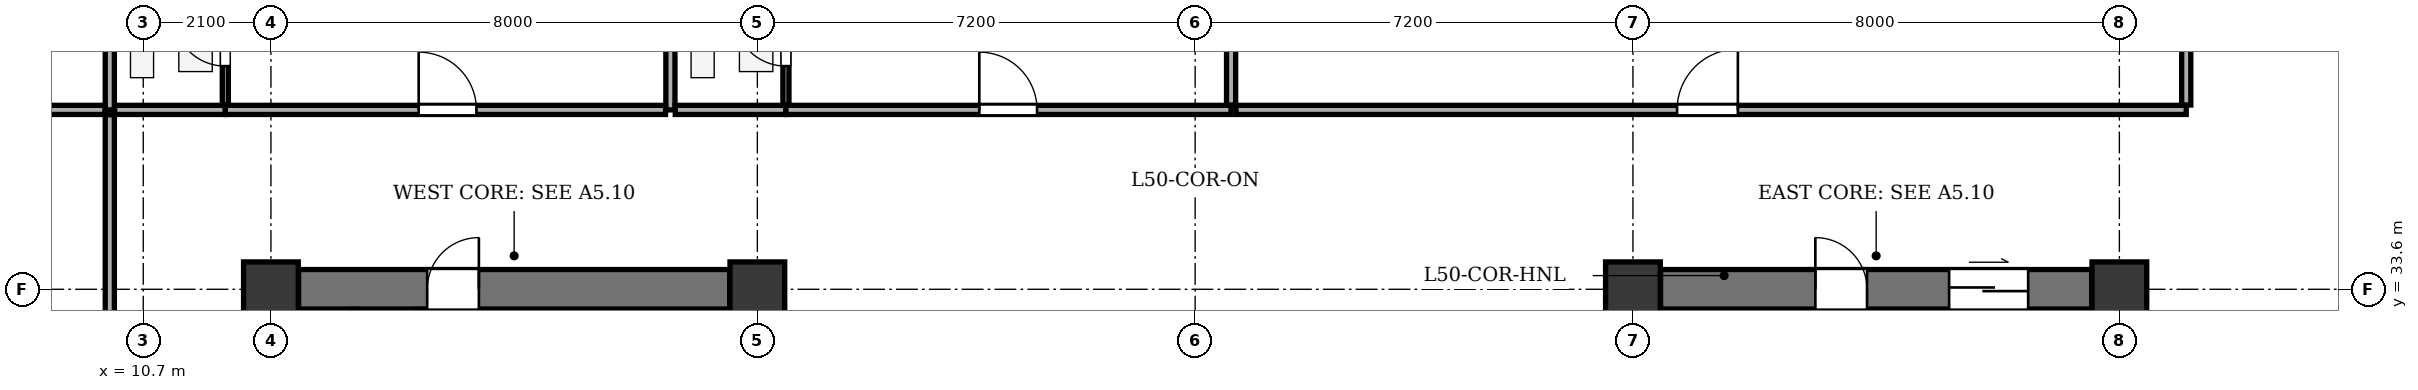
"""IFC4 building model, lengths in metres.
Left out: names, types, materials, properties, quantities, classifications, styles, units other than length and angle.
Written with IfcOpenShell. Run it as: python <this file> out.ifc"""

import sys

from ifc_helpers import new_model, si_unit, direction, frame, frame_2d, origin, origin_2d, place, context, subcontext, project, spatial, rectangle, extrude, element, fill, save


model = new_model("IFC4")
c1 = context("Model", 3, precision=1e-05, world=origin(), true_north=direction((0.0, 1.0)))
c2 = subcontext(c1, "Body", "Model", "MODEL_VIEW")
j1 = project(units=[si_unit("LENGTHUNIT", "METRE"), si_unit("PLANEANGLEUNIT", "RADIAN")], contexts=[c1])
p1 = place(None, origin())
s1 = spatial("IfcSite", under=j1, at=p1, CompositionType="ELEMENT")
p2 = place(p1, origin())
s2 = spatial("IfcBuilding", under=s1, at=p2, CompositionType="ELEMENT")
p3 = place(p2, frame((0.0, 0.0, 193.8)))
s3 = spatial("IfcBuildingStorey", under=s2, at=p3, CompositionType="ELEMENT", Elevation=193.8)
for number, where, z_axis, x_axis in (
    (1, (12.8, 33.6, 0.0), (0.0, 0.0, 1.0), (1.0, 0.0, 0.0)),
    (2, (20.8, 33.6, 0.0), (0.0, 0.0, 1.0), (1.0, 0.0, 0.0)),
    (3, (35.2, 33.6, 0.0), (0.0, 0.0, 1.0), (1.0, 0.0, 0.0)),
    (4, (43.2, 33.6, 0.0), (0.0, 0.0, 1.0), (1.0, 0.0, 0.0)),
):
    element("IfcColumn", number, at=place(p3, frame(where, z_axis=z_axis, x_axis=x_axis)), inside=s3, PredefinedType="COLUMN", context=c2, shape_type="SweptSolid", body=[
        extrude(rectangle(XDim=0.9, YDim=0.9, at=origin_2d()), origin(), (0.0, 0.0, 1.0), 3.5),
    ])
p4 = place(p3, frame((13.255, 33.6, 0.0), z_axis=(0.0, 0.0, 1.0), x_axis=(1.0, 0.0, 0.0)))
e5 = element("IfcWall", 5, at=p4, inside=s3, PredefinedType="SHEAR", context=c2, shape_type="SweptSolid", body=[
    extrude(rectangle(XDim=7.09, YDim=0.65, at=frame_2d((3.545, 0.0))), origin(), (0.0, 0.0, 1.0), 3.05),
])
p5 = place(p4, frame((2.115, 0.0, 0.0)))
e6 = element("IfcOpeningElement", 6, at=p5, cuts=e5, PredefinedType="OPENING", context=c2, shape_type="SweptSolid", body=[
    extrude(rectangle(XDim=0.85, YDim=2.02, at=frame_2d((0.425, 1.01))), frame((0.0, 0.335, 0.0), z_axis=(0.0, -1.0, 0.0), x_axis=(1.0, 0.0, 0.0)), (0.0, 0.0, 1.0), 0.67),
])
p6 = place(p3, frame((16.435, 21.135, 0.0), z_axis=(0.0, 0.0, 1.0), x_axis=(0.0, 1.0, 0.0)))
e7 = element("IfcWall", 7, at=p6, inside=s3, PredefinedType="SHEAR", context=c2, shape_type="SweptSolid", body=[
    extrude(rectangle(XDim=12.13, YDim=0.25, at=frame_2d((6.065, 0.0))), origin(), (0.0, 0.0, 1.0), 3.05),
])
p7 = place(p6, frame((0.515, 0.0, 0.0)))
e8 = element("IfcOpeningElement", 8, at=p7, cuts=e7, PredefinedType="OPENING", context=c2, shape_type="SweptSolid", body=[
    extrude(rectangle(XDim=1.2, YDim=2.15, at=frame_2d((0.6, 1.075))), frame((0.0, 0.135, 0.0), z_axis=(0.0, -1.0, 0.0), x_axis=(1.0, 0.0, 0.0)), (0.0, 0.0, 1.0), 0.27),
])
p8 = place(p6, frame((2.665, 0.0, 0.0)))
e9 = element("IfcOpeningElement", 9, at=p8, cuts=e7, PredefinedType="OPENING", context=c2, shape_type="SweptSolid", body=[
    extrude(rectangle(XDim=1.15, YDim=2.15, at=frame_2d((0.575, 1.075))), frame((0.0, 0.135, 0.0), z_axis=(0.0, -1.0, 0.0), x_axis=(1.0, 0.0, 0.0)), (0.0, 0.0, 1.0), 0.27),
])
p9 = place(p3, frame((18.12, 31.17, 0.0), z_axis=(0.0, 0.0, 1.0), x_axis=(0.0, 1.0, 0.0)))
e10 = element("IfcWall", 10, at=p9, inside=s3, PredefinedType="PARTITIONING", context=c2, shape_type="SweptSolid", body=[
    extrude(rectangle(XDim=2.095, YDim=0.18, at=frame_2d((1.047, 0.0))), origin(), (0.0, 0.0, 1.0), 3.05),
])
p10 = place(p3, frame((35.655, 33.6, 0.0), z_axis=(0.0, 0.0, 1.0), x_axis=(1.0, 0.0, 0.0)))
e11 = element("IfcWall", 11, at=p10, inside=s3, PredefinedType="SHEAR", context=c2, shape_type="SweptSolid", body=[
    extrude(rectangle(XDim=7.09, YDim=0.65, at=frame_2d((3.545, 0.0))), origin(), (0.0, 0.0, 1.0), 3.05),
])
p11 = place(p10, frame((4.745, 0.0, 0.0)))
e12 = element("IfcOpeningElement", 12, at=p11, cuts=e11, PredefinedType="OPENING", context=c2, shape_type="SweptSolid", body=[
    extrude(rectangle(XDim=1.3, YDim=2.15, at=frame_2d((0.65, 1.075))), frame((0.0, 0.335, 0.0), z_axis=(0.0, -1.0, 0.0), x_axis=(1.0, 0.0, 0.0)), (0.0, 0.0, 1.0), 0.67),
])
p12 = place(p10, frame((2.545, 0.0, 0.0)))
e13 = element("IfcOpeningElement", 13, at=p12, cuts=e11, PredefinedType="OPENING", context=c2, shape_type="SweptSolid", body=[
    extrude(rectangle(XDim=0.85, YDim=2.02, at=frame_2d((0.425, 1.01))), frame((0.0, 0.335, 0.0), z_axis=(0.0, -1.0, 0.0), x_axis=(1.0, 0.0, 0.0)), (0.0, 0.0, 1.0), 0.67),
])
p13 = place(p3, frame((39.565, 21.135, 0.0), z_axis=(0.0, 0.0, 1.0), x_axis=(0.0, 1.0, 0.0)))
e14 = element("IfcWall", 14, at=p13, inside=s3, PredefinedType="SHEAR", context=c2, shape_type="SweptSolid", body=[
    extrude(rectangle(XDim=12.13, YDim=0.25, at=frame_2d((6.065, 0.0))), origin(), (0.0, 0.0, 1.0), 3.05),
])
p14 = place(p13, frame((0.515, 0.0, 0.0)))
e15 = element("IfcOpeningElement", 15, at=p14, cuts=e14, PredefinedType="OPENING", context=c2, shape_type="SweptSolid", body=[
    extrude(rectangle(XDim=1.2, YDim=2.15, at=frame_2d((0.6, 1.075))), frame((0.0, 0.135, 0.0), z_axis=(0.0, -1.0, 0.0), x_axis=(1.0, 0.0, 0.0)), (0.0, 0.0, 1.0), 0.27),
])
p15 = place(p13, frame((2.665, 0.0, 0.0)))
e16 = element("IfcOpeningElement", 16, at=p15, cuts=e14, PredefinedType="OPENING", context=c2, shape_type="SweptSolid", body=[
    extrude(rectangle(XDim=1.15, YDim=2.15, at=frame_2d((0.575, 1.075))), frame((0.0, 0.135, 0.0), z_axis=(0.0, -1.0, 0.0), x_axis=(1.0, 0.0, 0.0)), (0.0, 0.0, 1.0), 0.27),
])
p16 = place(p3, frame((37.9, 25.27, 0.0), z_axis=(0.0, 0.0, 1.0), x_axis=(0.0, 1.0, 0.0)))
e17 = element("IfcWall", 17, at=p16, inside=s3, PredefinedType="SOLIDWALL", context=c2, shape_type="SweptSolid", body=[
    extrude(rectangle(XDim=7.995, YDim=0.2, at=frame_2d((3.998, 0.0))), origin(), (0.0, 0.0, 1.0), 3.05),
])
p17 = place(p3, frame((14.18, 30.96, 0.0), z_axis=(0.0, 0.0, 1.0), x_axis=(0.0, 1.0, 0.0)))
e18 = element("IfcWall", 18, at=p17, inside=s3, PredefinedType="PARTITIONING", context=c2, shape_type="SweptSolid", body=[
    extrude(rectangle(XDim=2.31, YDim=0.15, at=frame_2d((1.155, 0.0))), origin(), (0.0, 0.0, 1.0), 3.05),
])
p18 = place(p17, frame((0.47, 0.0, 0.0)))
e19 = element("IfcOpeningElement", 19, at=p18, cuts=e18, PredefinedType="OPENING", context=c2, shape_type="SweptSolid", body=[
    extrude(rectangle(XDim=0.85, YDim=2.02, at=frame_2d((0.425, 1.01))), frame((0.0, 0.085, 0.0), z_axis=(0.0, -1.0, 0.0), x_axis=(1.0, 0.0, 0.0)), (0.0, 0.0, 1.0), 0.17),
])
p19 = place(p3, frame((15.25, 30.96, 0.0), z_axis=(0.0, 0.0, 1.0), x_axis=(0.0, 1.0, 0.0)))
e20 = element("IfcWall", 20, at=p19, inside=s3, PredefinedType="PARTITIONING", context=c2, shape_type="SweptSolid", body=[
    extrude(rectangle(XDim=2.31, YDim=0.15, at=frame_2d((1.155, 0.0))), origin(), (0.0, 0.0, 1.0), 3.05),
])
p20 = place(p19, frame((0.47, 0.0, 0.0)))
e21 = element("IfcOpeningElement", 21, at=p20, cuts=e20, PredefinedType="OPENING", context=c2, shape_type="SweptSolid", body=[
    extrude(rectangle(XDim=0.85, YDim=2.02, at=frame_2d((0.425, 1.01))), frame((0.0, 0.085, 0.0), z_axis=(0.0, -1.0, 0.0), x_axis=(1.0, 0.0, 0.0)), (0.0, 0.0, 1.0), 0.17),
])
for number, where, z_axis, x_axis in (
    (22, (10.15, 36.55, 0.0), (0.0, 0.0, 1.0), (0.0, 1.0, 0.0)),
    (23, (19.37, 36.55, 0.0), (0.0, 0.0, 1.0), (0.0, 1.0, 0.0)),
):
    element("IfcWall", number, at=place(p3, frame(where, z_axis=z_axis, x_axis=x_axis)), inside=s3, PredefinedType="PARTITIONING", context=c2, shape_type="SweptSolid", body=[
        extrude(rectangle(XDim=15.975, YDim=0.15, at=frame_2d((7.987, 0.0))), origin(), (0.0, 0.0, 1.0), 3.05),
    ])
p21 = place(p3, frame((10.23, 36.55, 0.0), z_axis=(0.0, 0.0, 1.0), x_axis=(1.0, 0.0, 0.0)))
e24 = element("IfcWall", 24, at=p21, inside=s3, PredefinedType="PARTITIONING", context=c2, shape_type="SweptSolid", body=[
    extrude(rectangle(XDim=1.82, YDim=0.15, at=frame_2d((0.91, 0.0))), origin(), (0.0, 0.0, 1.0), 3.05),
])
p22 = place(p3, frame((12.05, 36.55, 0.0), z_axis=(0.0, 0.0, 1.0), x_axis=(1.0, 0.0, 0.0)))
e25 = element("IfcWall", 25, at=p22, inside=s3, PredefinedType="PARTITIONING", context=c2, shape_type="SweptSolid", body=[
    extrude(rectangle(XDim=7.24, YDim=0.15, at=frame_2d((3.62, 0.0))), origin(), (0.0, 0.0, 1.0), 3.05),
])
p23 = place(p22, frame((3.18, 0.0, 0.0)))
e26 = element("IfcOpeningElement", 26, at=p23, cuts=e25, PredefinedType="OPENING", context=c2, shape_type="SweptSolid", body=[
    extrude(rectangle(XDim=0.95, YDim=2.1, at=frame_2d((0.475, 1.05))), frame((0.0, 0.085, 0.0), z_axis=(0.0, -1.0, 0.0), x_axis=(1.0, 0.0, 0.0)), (0.0, 0.0, 1.0), 0.17),
])
p24 = place(p3, frame((12.05, 36.63, 0.0), z_axis=(0.0, 0.0, 1.0), x_axis=(0.0, 1.0, 0.0)))
e27 = element("IfcWall", 27, at=p24, inside=s3, PredefinedType="PARTITIONING", context=c2, shape_type="SweptSolid", body=[
    extrude(rectangle(XDim=2.25, YDim=0.1, at=frame_2d((1.125, 0.0))), origin(), (0.0, 0.0, 1.0), 3.05),
])
p25 = place(p24, frame((0.64, 0.0, 0.0)))
e28 = element("IfcOpeningElement", 28, at=p25, cuts=e27, PredefinedType="OPENING", context=c2, shape_type="SweptSolid", body=[
    extrude(rectangle(XDim=0.85, YDim=2.05, at=frame_2d((0.425, 1.025))), frame((0.0, 0.06, 0.0), z_axis=(0.0, -1.0, 0.0), x_axis=(1.0, 0.0, 0.0)), (0.0, 0.0, 1.0), 0.12),
])
p26 = place(p3, frame((19.45, 36.55, 0.0), z_axis=(0.0, 0.0, 1.0), x_axis=(1.0, 0.0, 0.0)))
e29 = element("IfcWall", 29, at=p26, inside=s3, PredefinedType="PARTITIONING", context=c2, shape_type="SweptSolid", body=[
    extrude(rectangle(XDim=1.82, YDim=0.15, at=frame_2d((0.91, 0.0))), origin(), (0.0, 0.0, 1.0), 3.05),
])
p27 = place(p3, frame((21.27, 36.55, 0.0), z_axis=(0.0, 0.0, 1.0), x_axis=(1.0, 0.0, 0.0)))
e30 = element("IfcWall", 30, at=p27, inside=s3, PredefinedType="PARTITIONING", context=c2, shape_type="SweptSolid", body=[
    extrude(rectangle(XDim=7.321, YDim=0.15, at=frame_2d((3.661, 0.0))), origin(), (0.0, 0.0, 1.0), 3.05),
])
p28 = place(p27, frame((3.18, 0.0, 0.0)))
e31 = element("IfcOpeningElement", 31, at=p28, cuts=e30, PredefinedType="OPENING", context=c2, shape_type="SweptSolid", body=[
    extrude(rectangle(XDim=0.95, YDim=2.1, at=frame_2d((0.475, 1.05))), frame((0.0, 0.085, 0.0), z_axis=(0.0, -1.0, 0.0), x_axis=(1.0, 0.0, 0.0)), (0.0, 0.0, 1.0), 0.17),
])
p29 = place(p3, frame((21.27, 36.63, 0.0), z_axis=(0.0, 0.0, 1.0), x_axis=(0.0, 1.0, 0.0)))
e32 = element("IfcWall", 32, at=p29, inside=s3, PredefinedType="PARTITIONING", context=c2, shape_type="SweptSolid", body=[
    extrude(rectangle(XDim=2.25, YDim=0.1, at=frame_2d((1.125, 0.0))), origin(), (0.0, 0.0, 1.0), 3.05),
])
p30 = place(p29, frame((0.64, 0.0, 0.0)))
e33 = element("IfcOpeningElement", 33, at=p30, cuts=e32, PredefinedType="OPENING", context=c2, shape_type="SweptSolid", body=[
    extrude(rectangle(XDim=0.85, YDim=2.05, at=frame_2d((0.425, 1.025))), frame((0.0, 0.06, 0.0), z_axis=(0.0, -1.0, 0.0), x_axis=(1.0, 0.0, 0.0)), (0.0, 0.0, 1.0), 0.12),
])
p31 = place(p3, frame((28.591, 36.63, 0.0), z_axis=(0.0, 0.0, 1.0), x_axis=(0.0, 1.0, 0.0)))
e34 = element("IfcWall", 34, at=p31, inside=s3, PredefinedType="PARTITIONING", context=c2, shape_type="SweptSolid", body=[
    extrude(rectangle(XDim=15.895, YDim=0.15, at=frame_2d((7.948, 0.0))), origin(), (0.0, 0.0, 1.0), 3.05),
])
p32 = place(p3, frame((28.671, 36.55, 0.0), z_axis=(0.0, 0.0, 1.0), x_axis=(1.0, 0.0, 0.0)))
e35 = element("IfcWall", 35, at=p32, inside=s3, PredefinedType="PARTITIONING", context=c2, shape_type="SweptSolid", body=[
    extrude(rectangle(XDim=15.629, YDim=0.15, at=frame_2d((7.814, 0.0))), origin(), (0.0, 0.0, 1.0), 3.05),
])
p33 = place(p32, frame((7.255, 0.0, 0.0)))
e36 = element("IfcOpeningElement", 36, at=p33, cuts=e35, PredefinedType="OPENING", context=c2, shape_type="SweptSolid", body=[
    extrude(rectangle(XDim=1.0, YDim=2.1, at=frame_2d((0.5, 1.05))), frame((0.0, 0.085, 0.0), z_axis=(0.0, -1.0, 0.0), x_axis=(1.0, 0.0, 0.0)), (0.0, 0.0, 1.0), 0.17),
])
p34 = place(p3, frame((44.3, 36.63, 0.0), z_axis=(0.0, 0.0, 1.0), x_axis=(0.0, 1.0, 0.0)))
e37 = element("IfcWall", 37, at=p34, inside=s3, PredefinedType="PARTITIONING", context=c2, shape_type="SweptSolid", body=[
    extrude(rectangle(XDim=15.895, YDim=0.15, at=frame_2d((7.948, 0.0))), origin(), (0.0, 0.0, 1.0), 3.05),
])
p35 = place(p3, frame((4.675, 36.55, 0.0), z_axis=(0.0, 0.0, 1.0), x_axis=(1.0, 0.0, 0.0)))
e38 = element("IfcWall", 38, at=p35, inside=s3, PredefinedType="PARTITIONING", context=c2, shape_type="SweptSolid", body=[
    extrude(rectangle(XDim=5.395, YDim=0.15, at=frame_2d((2.698, 0.0))), origin(), (0.0, 0.0, 1.0), 3.05),
])
p36 = place(p3, frame((10.15, 17.93, 0.0), z_axis=(0.0, 0.0, 1.0), x_axis=(0.0, 1.0, 0.0)))
e39 = element("IfcWall", 39, at=p36, inside=s3, PredefinedType="PARTITIONING", context=c2, shape_type="SweptSolid", body=[
    extrude(rectangle(XDim=18.54, YDim=0.15, at=frame_2d((9.27, 0.0))), origin(), (0.0, 0.0, 1.0), 3.05),
])
p37 = place(p36, frame((8.79, 0.0, 0.0)))
e40 = element("IfcOpeningElement", 40, at=p37, cuts=e39, PredefinedType="OPENING", context=c2, shape_type="SweptSolid", body=[
    extrude(rectangle(XDim=0.95, YDim=2.1, at=frame_2d((0.475, 1.05))), frame((0.0, 0.085, 0.0), z_axis=(0.0, -1.0, 0.0), x_axis=(1.0, 0.0, 0.0)), (0.0, 0.0, 1.0), 0.17),
])
p38 = place(p5, origin())
e41 = element("IfcDoor", 41, at=p38, inside=s3, OperationType="SINGLE_SWING_RIGHT", PredefinedType="DOOR", context=c2, shape_type="SweptSolid", body=[
    extrude(rectangle(XDim=0.85, YDim=2.02, at=frame_2d((0.425, 1.01))), frame((0.0, 0.025, 0.0), z_axis=(0.0, -1.0, 0.0), x_axis=(1.0, 0.0, 0.0)), (0.0, 0.0, 1.0), 0.05),
])
fill(e6, e41)
p39 = place(p11, origin())
e42 = element("IfcDoor", 42, at=p39, inside=s3, OperationType="DOUBLE_DOOR_SLIDING", PredefinedType="DOOR", context=c2, shape_type="SweptSolid", body=[
    extrude(rectangle(XDim=1.3, YDim=2.15, at=frame_2d((0.65, 1.075))), frame((0.0, 0.025, 0.0), z_axis=(0.0, -1.0, 0.0), x_axis=(1.0, 0.0, 0.0)), (0.0, 0.0, 1.0), 0.05),
])
fill(e12, e42)
p40 = place(p12, origin())
e43 = element("IfcDoor", 43, at=p40, inside=s3, OperationType="SINGLE_SWING_LEFT", PredefinedType="DOOR", context=c2, shape_type="SweptSolid", body=[
    extrude(rectangle(XDim=0.85, YDim=2.02, at=frame_2d((0.425, 1.01))), frame((0.0, 0.025, 0.0), z_axis=(0.0, -1.0, 0.0), x_axis=(1.0, 0.0, 0.0)), (0.0, 0.0, 1.0), 0.05),
])
fill(e13, e43)
p41 = place(p25, origin())
e44 = element("IfcDoor", 44, at=p41, inside=s3, OperationType="SINGLE_SWING_RIGHT", PredefinedType="DOOR", context=c2, shape_type="SweptSolid", body=[
    extrude(rectangle(XDim=0.85, YDim=2.05, at=frame_2d((0.425, 1.025))), frame((0.0, 0.025, 0.0), z_axis=(0.0, -1.0, 0.0), x_axis=(1.0, 0.0, 0.0)), (0.0, 0.0, 1.0), 0.05),
])
fill(e28, e44)
p42 = place(p23, origin())
e45 = element("IfcDoor", 45, at=p42, inside=s3, OperationType="SINGLE_SWING_LEFT", PredefinedType="DOOR", context=c2, shape_type="SweptSolid", body=[
    extrude(rectangle(XDim=0.95, YDim=2.1, at=frame_2d((0.475, 1.05))), frame((0.0, 0.025, 0.0), z_axis=(0.0, -1.0, 0.0), x_axis=(1.0, 0.0, 0.0)), (0.0, 0.0, 1.0), 0.05),
])
fill(e26, e45)
p43 = place(p30, origin())
e46 = element("IfcDoor", 46, at=p43, inside=s3, OperationType="SINGLE_SWING_RIGHT", PredefinedType="DOOR", context=c2, shape_type="SweptSolid", body=[
    extrude(rectangle(XDim=0.85, YDim=2.05, at=frame_2d((0.425, 1.025))), frame((0.0, 0.025, 0.0), z_axis=(0.0, -1.0, 0.0), x_axis=(1.0, 0.0, 0.0)), (0.0, 0.0, 1.0), 0.05),
])
fill(e33, e46)
p44 = place(p28, origin())
e47 = element("IfcDoor", 47, at=p44, inside=s3, OperationType="SINGLE_SWING_LEFT", PredefinedType="DOOR", context=c2, shape_type="SweptSolid", body=[
    extrude(rectangle(XDim=0.95, YDim=2.1, at=frame_2d((0.475, 1.05))), frame((0.0, 0.025, 0.0), z_axis=(0.0, -1.0, 0.0), x_axis=(1.0, 0.0, 0.0)), (0.0, 0.0, 1.0), 0.05),
])
fill(e31, e47)
p45 = place(p33, origin())
e48 = element("IfcDoor", 48, at=p45, inside=s3, OperationType="SINGLE_SWING_RIGHT", PredefinedType="DOOR", context=c2, shape_type="SweptSolid", body=[
    extrude(rectangle(XDim=1.0, YDim=2.1, at=frame_2d((0.5, 1.05))), frame((0.0, 0.025, 0.0), z_axis=(0.0, -1.0, 0.0), x_axis=(1.0, 0.0, 0.0)), (0.0, 0.0, 1.0), 0.05),
])
fill(e36, e48)
save(model, sys.argv[1])
